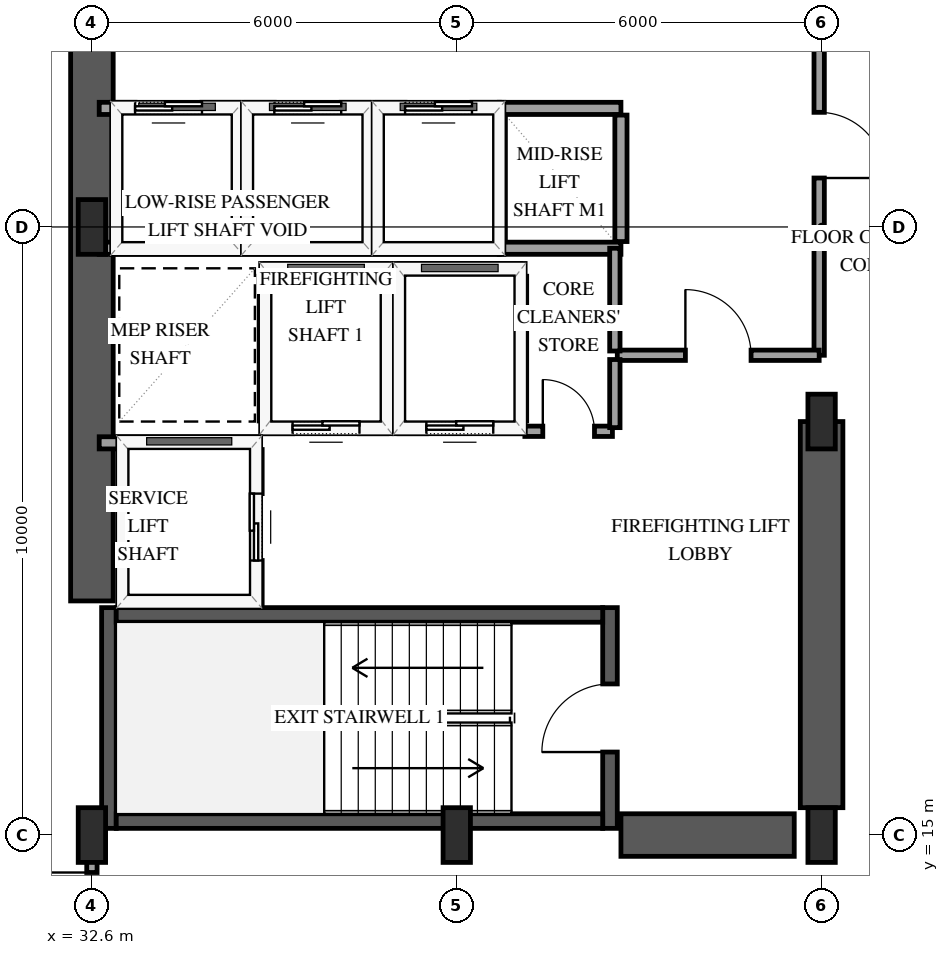
"""IFC4 building model, lengths in metres.
Left out: names, types, materials, properties, quantities, classifications, styles, units other than length and angle.
Written with IfcOpenShell. Run it as: python <this file> out.ifc"""

import sys

from ifc_helpers import new_model, si_unit, direction, frame, frame_2d, origin, origin_2d, place, context, subcontext, project, spatial, rectangle, extrude, element, fill, save


model = new_model("IFC4")
c1 = context("Model", 3, precision=1e-05, world=origin(), true_north=direction((0.0, 1.0)))
c2 = subcontext(c1, "Body", "Model", "MODEL_VIEW")
j1 = project(units=[si_unit("LENGTHUNIT", "METRE"), si_unit("PLANEANGLEUNIT", "RADIAN")], contexts=[c1])
p1 = place(None, origin())
s1 = spatial("IfcSite", under=j1, at=p1, CompositionType="ELEMENT")
p2 = place(p1, origin())
s2 = spatial("IfcBuilding", under=s1, at=p2, CompositionType="ELEMENT")
p3 = place(p2, frame((0.0, 0.0, 34.6)))
s3 = spatial("IfcBuildingStorey", under=s2, at=p3, CompositionType="ELEMENT", Elevation=34.6)
p4 = place(p3, frame((32.88, 15.11, 0.0), z_axis=(0.0, 0.0, 1.0), x_axis=(0.0, 1.0, 0.0)))
e1 = element("IfcWall", 1, at=p4, inside=s3, PredefinedType="SHEAR", context=c2, shape_type="SweptSolid", body=[
    extrude(rectangle(XDim=3.63, YDim=0.24, at=frame_2d((1.815, 0.0))), origin(), (0.0, 0.0, 1.0), 4.0),
])
p5 = place(p3, frame((41.12, 15.11, 0.0), z_axis=(0.0, 0.0, 1.0), x_axis=(0.0, 1.0, 0.0)))
e2 = element("IfcWall", 2, at=p5, inside=s3, PredefinedType="SHEAR", context=c2, shape_type="SweptSolid", body=[
    extrude(rectangle(XDim=3.63, YDim=0.24, at=frame_2d((1.815, 0.0))), origin(), (0.0, 0.0, 1.0), 4.0),
])
p6 = place(p5, frame((1.255, 0.0, 0.0)))
e3 = element("IfcOpeningElement", 3, at=p6, cuts=e2, PredefinedType="OPENING", context=c2, shape_type="SweptSolid", body=[
    extrude(rectangle(XDim=1.12, YDim=2.15, at=frame_2d((0.56, 1.075))), frame((0.0, 0.13, 0.0), z_axis=(0.0, -1.0, 0.0), x_axis=(1.0, 0.0, 0.0)), (0.0, 0.0, 1.0), 0.26),
])
for number, where, z_axis, x_axis in (
    (4, (33.0, 15.23, 0.0), (0.0, 0.0, 1.0), (1.0, 0.0, 0.0)),
    (5, (33.0, 18.62, 0.0), (0.0, 0.0, 1.0), (1.0, 0.0, 0.0)),
):
    element("IfcWall", number, at=place(p3, frame(where, z_axis=z_axis, x_axis=x_axis)), inside=s3, PredefinedType="SHEAR", context=c2, shape_type="SweptSolid", body=[
        extrude(rectangle(XDim=8.0, YDim=0.24, at=frame_2d((4.0, 0.0))), origin(), (0.0, 0.0, 1.0), 4.0),
    ])
p7 = place(p3, frame((32.6, 18.85, 0.0), z_axis=(0.0, 0.0, 1.0), x_axis=(0.0, 1.0, 0.0)))
e6 = element("IfcWall", 6, at=p7, inside=s3, PredefinedType="SHEAR", context=c2, shape_type="SweptSolid", body=[
    extrude(rectangle(XDim=12.3, YDim=0.7, at=frame_2d((6.15, 0.0))), origin(), (0.0, 0.0, 1.0), 4.0),
])
p8 = place(p3, frame((41.3, 15.0, 0.0), z_axis=(0.0, 0.0, 1.0), x_axis=(1.0, 0.0, 0.0)))
e7 = element("IfcWall", 7, at=p8, inside=s3, PredefinedType="SHEAR", context=c2, shape_type="SweptSolid", body=[
    extrude(rectangle(XDim=2.85, YDim=0.7, at=frame_2d((1.425, 0.0))), origin(), (0.0, 0.0, 1.0), 4.0),
])
p9 = place(p3, frame((44.6, 15.45, 0.0), z_axis=(0.0, 0.0, 1.0), x_axis=(0.0, 1.0, 0.0)))
e8 = element("IfcWall", 8, at=p9, inside=s3, PredefinedType="SHEAR", context=c2, shape_type="SweptSolid", body=[
    extrude(rectangle(XDim=6.35, YDim=0.7, at=frame_2d((3.175, 0.0))), origin(), (0.0, 0.0, 1.0), 4.0),
])
for number, where, z_axis, x_axis in (
    (9, (32.6, 15.0, 0.0), (0.0, 0.0, 1.0), (1.0, 0.0, 0.0)),
    (10, (32.6, 25.0, 0.0), (0.0, 0.0, 1.0), (1.0, 0.0, 0.0)),
    (11, (38.6, 15.0, 0.0), (0.0, 0.0, 1.0), (1.0, 0.0, 0.0)),
    (12, (44.6, 15.0, 0.0), (0.0, 0.0, 1.0), (1.0, 0.0, 0.0)),
    (13, (44.6, 21.8, 0.0), (0.0, 0.0, 1.0), (1.0, 0.0, 0.0)),
):
    element("IfcColumn", number, at=place(p3, frame(where, z_axis=z_axis, x_axis=x_axis)), inside=s3, PredefinedType="PILASTER", context=c2, shape_type="SweptSolid", body=[
        extrude(rectangle(XDim=0.45, YDim=0.9, at=origin_2d()), origin(), (0.0, 0.0, 1.0), 4.0),
    ])
p10 = place(p3, frame((35.45, 21.7, 0.0), z_axis=(0.0, 0.0, 1.0), x_axis=(1.0, 0.0, 0.0)))
e14 = element("IfcWall", 14, at=p10, inside=s3, PredefinedType="SOLIDWALL", context=c2, shape_type="SweptSolid", body=[
    extrude(rectangle(XDim=2.0, YDim=0.2, at=frame_2d((1.0, 0.0))), origin(), (0.0, 0.0, 1.0), 3.7),
])
p11 = place(p10, frame((0.45, 0.0, 0.0)))
e15 = element("IfcOpeningElement", 15, at=p11, cuts=e14, PredefinedType="OPENING", context=c2, shape_type="SweptSolid", body=[
    extrude(rectangle(XDim=1.1, YDim=2.15, at=frame_2d((0.55, 1.075))), frame((0.0, 0.11, 0.0), z_axis=(0.0, -1.0, 0.0), x_axis=(1.0, 0.0, 0.0)), (0.0, 0.0, 1.0), 0.22),
])
p12 = place(p3, frame((35.45, 24.3, 0.0), z_axis=(0.0, 0.0, 1.0), x_axis=(1.0, 0.0, 0.0)))
e16 = element("IfcWall", 16, at=p12, inside=s3, PredefinedType="SOLIDWALL", context=c2, shape_type="SweptSolid", body=[
    extrude(rectangle(XDim=2.0, YDim=0.2, at=frame_2d((1.0, 0.0))), origin(), (0.0, 0.0, 1.0), 3.7),
])
for number, where, z_axis, x_axis in (
    (17, (35.45, 21.81, 0.0), (0.0, 0.0, 1.0), (0.0, 1.0, 0.0)),
    (18, (37.45, 21.81, 0.0), (0.0, 0.0, 1.0), (0.0, 1.0, 0.0)),
):
    element("IfcWall", number, at=place(p3, frame(where, z_axis=z_axis, x_axis=x_axis)), inside=s3, PredefinedType="SOLIDWALL", context=c2, shape_type="SweptSolid", body=[
        extrude(rectangle(XDim=2.38, YDim=0.2, at=frame_2d((1.19, 0.0))), origin(), (0.0, 0.0, 1.0), 3.7),
    ])
p13 = place(p3, frame((37.65, 21.7, 0.0), z_axis=(0.0, 0.0, 1.0), x_axis=(1.0, 0.0, 0.0)))
e19 = element("IfcWall", 19, at=p13, inside=s3, PredefinedType="SOLIDWALL", context=c2, shape_type="SweptSolid", body=[
    extrude(rectangle(XDim=2.0, YDim=0.2, at=frame_2d((1.0, 0.0))), origin(), (0.0, 0.0, 1.0), 3.7),
])
p14 = place(p13, frame((0.45, 0.0, 0.0)))
e20 = element("IfcOpeningElement", 20, at=p14, cuts=e19, PredefinedType="OPENING", context=c2, shape_type="SweptSolid", body=[
    extrude(rectangle(XDim=1.1, YDim=2.15, at=frame_2d((0.55, 1.075))), frame((0.0, 0.11, 0.0), z_axis=(0.0, -1.0, 0.0), x_axis=(1.0, 0.0, 0.0)), (0.0, 0.0, 1.0), 0.22),
])
p15 = place(p3, frame((37.65, 24.3, 0.0), z_axis=(0.0, 0.0, 1.0), x_axis=(1.0, 0.0, 0.0)))
e21 = element("IfcWall", 21, at=p15, inside=s3, PredefinedType="SOLIDWALL", context=c2, shape_type="SweptSolid", body=[
    extrude(rectangle(XDim=2.0, YDim=0.2, at=frame_2d((1.0, 0.0))), origin(), (0.0, 0.0, 1.0), 3.7),
])
p16 = place(p3, frame((39.65, 21.81, 0.0), z_axis=(0.0, 0.0, 1.0), x_axis=(0.0, 1.0, 0.0)))
e22 = element("IfcWall", 22, at=p16, inside=s3, PredefinedType="SOLIDWALL", context=c2, shape_type="SweptSolid", body=[
    extrude(rectangle(XDim=2.38, YDim=0.2, at=frame_2d((1.19, 0.0))), origin(), (0.0, 0.0, 1.0), 3.7),
])
p17 = place(p3, frame((32.72, 21.45, 0.0), z_axis=(0.0, 0.0, 1.0), x_axis=(1.0, 0.0, 0.0)))
e23 = element("IfcWall", 23, at=p17, inside=s3, PredefinedType="SOLIDWALL", context=c2, shape_type="SweptSolid", body=[
    extrude(rectangle(XDim=2.58, YDim=0.2, at=frame_2d((1.29, 0.0))), origin(), (0.0, 0.0, 1.0), 3.7),
])
p18 = place(p3, frame((35.3, 18.79, 0.0), z_axis=(0.0, 0.0, 1.0), x_axis=(0.0, 1.0, 0.0)))
e24 = element("IfcWall", 24, at=p18, inside=s3, PredefinedType="SOLIDWALL", context=c2, shape_type="SweptSolid", body=[
    extrude(rectangle(XDim=2.55, YDim=0.2, at=frame_2d((1.275, 0.0))), origin(), (0.0, 0.0, 1.0), 3.7),
])
p19 = place(p18, frame((0.725, 0.0, 0.0)))
e25 = element("IfcOpeningElement", 25, at=p19, cuts=e24, PredefinedType="OPENING", context=c2, shape_type="SweptSolid", body=[
    extrude(rectangle(XDim=1.1, YDim=2.15, at=frame_2d((0.55, 1.075))), frame((0.0, 0.11, 0.0), z_axis=(0.0, -1.0, 0.0), x_axis=(1.0, 0.0, 0.0)), (0.0, 0.0, 1.0), 0.22),
])
p20 = place(p3, frame((32.72, 24.65, 0.0), z_axis=(0.0, 0.0, 1.0), x_axis=(1.0, 0.0, 0.0)))
e26 = element("IfcWall", 26, at=p20, inside=s3, PredefinedType="SOLIDWALL", context=c2, shape_type="SweptSolid", body=[
    extrude(rectangle(XDim=2.28, YDim=0.2, at=frame_2d((1.14, 0.0))), origin(), (0.0, 0.0, 1.0), 3.7),
])
p21 = place(p3, frame((32.72, 26.95, 0.0), z_axis=(0.0, 0.0, 1.0), x_axis=(1.0, 0.0, 0.0)))
e27 = element("IfcWall", 27, at=p21, inside=s3, PredefinedType="SOLIDWALL", context=c2, shape_type="SweptSolid", body=[
    extrude(rectangle(XDim=2.28, YDim=0.2, at=frame_2d((1.14, 0.0))), origin(), (0.0, 0.0, 1.0), 3.7),
])
p22 = place(p21, frame((0.59, 0.0, 0.0)))
e28 = element("IfcOpeningElement", 28, at=p22, cuts=e27, PredefinedType="OPENING", context=c2, shape_type="SweptSolid", body=[
    extrude(rectangle(XDim=1.1, YDim=2.15, at=frame_2d((0.55, 1.075))), frame((0.0, 0.11, 0.0), z_axis=(0.0, -1.0, 0.0), x_axis=(1.0, 0.0, 0.0)), (0.0, 0.0, 1.0), 0.22),
])
p23 = place(p3, frame((35.0, 24.76, 0.0), z_axis=(0.0, 0.0, 1.0), x_axis=(0.0, 1.0, 0.0)))
e29 = element("IfcWall", 29, at=p23, inside=s3, PredefinedType="SOLIDWALL", context=c2, shape_type="SweptSolid", body=[
    extrude(rectangle(XDim=2.08, YDim=0.2, at=frame_2d((1.04, 0.0))), origin(), (0.0, 0.0, 1.0), 3.7),
])
p24 = place(p3, frame((35.15, 24.65, 0.0), z_axis=(0.0, 0.0, 1.0), x_axis=(1.0, 0.0, 0.0)))
e30 = element("IfcWall", 30, at=p24, inside=s3, PredefinedType="SOLIDWALL", context=c2, shape_type="SweptSolid", body=[
    extrude(rectangle(XDim=2.0, YDim=0.2, at=frame_2d((1.0, 0.0))), origin(), (0.0, 0.0, 1.0), 3.7),
])
p25 = place(p3, frame((35.15, 26.95, 0.0), z_axis=(0.0, 0.0, 1.0), x_axis=(1.0, 0.0, 0.0)))
e31 = element("IfcWall", 31, at=p25, inside=s3, PredefinedType="SOLIDWALL", context=c2, shape_type="SweptSolid", body=[
    extrude(rectangle(XDim=2.0, YDim=0.2, at=frame_2d((1.0, 0.0))), origin(), (0.0, 0.0, 1.0), 3.7),
])
p26 = place(p25, frame((0.45, 0.0, 0.0)))
e32 = element("IfcOpeningElement", 32, at=p26, cuts=e31, PredefinedType="OPENING", context=c2, shape_type="SweptSolid", body=[
    extrude(rectangle(XDim=1.1, YDim=2.15, at=frame_2d((0.55, 1.075))), frame((0.0, 0.11, 0.0), z_axis=(0.0, -1.0, 0.0), x_axis=(1.0, 0.0, 0.0)), (0.0, 0.0, 1.0), 0.22),
])
p27 = place(p3, frame((37.15, 24.76, 0.0), z_axis=(0.0, 0.0, 1.0), x_axis=(0.0, 1.0, 0.0)))
e33 = element("IfcWall", 33, at=p27, inside=s3, PredefinedType="SOLIDWALL", context=c2, shape_type="SweptSolid", body=[
    extrude(rectangle(XDim=2.08, YDim=0.2, at=frame_2d((1.04, 0.0))), origin(), (0.0, 0.0, 1.0), 3.7),
])
p28 = place(p3, frame((37.3, 24.65, 0.0), z_axis=(0.0, 0.0, 1.0), x_axis=(1.0, 0.0, 0.0)))
e34 = element("IfcWall", 34, at=p28, inside=s3, PredefinedType="SOLIDWALL", context=c2, shape_type="SweptSolid", body=[
    extrude(rectangle(XDim=2.0, YDim=0.2, at=frame_2d((1.0, 0.0))), origin(), (0.0, 0.0, 1.0), 3.7),
])
p29 = place(p3, frame((37.3, 26.95, 0.0), z_axis=(0.0, 0.0, 1.0), x_axis=(1.0, 0.0, 0.0)))
e35 = element("IfcWall", 35, at=p29, inside=s3, PredefinedType="SOLIDWALL", context=c2, shape_type="SweptSolid", body=[
    extrude(rectangle(XDim=2.0, YDim=0.2, at=frame_2d((1.0, 0.0))), origin(), (0.0, 0.0, 1.0), 3.7),
])
p30 = place(p29, frame((0.45, 0.0, 0.0)))
e36 = element("IfcOpeningElement", 36, at=p30, cuts=e35, PredefinedType="OPENING", context=c2, shape_type="SweptSolid", body=[
    extrude(rectangle(XDim=1.1, YDim=2.15, at=frame_2d((0.55, 1.075))), frame((0.0, 0.11, 0.0), z_axis=(0.0, -1.0, 0.0), x_axis=(1.0, 0.0, 0.0)), (0.0, 0.0, 1.0), 0.22),
])
p31 = place(p3, frame((39.3, 24.76, 0.0), z_axis=(0.0, 0.0, 1.0), x_axis=(0.0, 1.0, 0.0)))
e37 = element("IfcWall", 37, at=p31, inside=s3, PredefinedType="SOLIDWALL", context=c2, shape_type="SweptSolid", body=[
    extrude(rectangle(XDim=2.08, YDim=0.2, at=frame_2d((1.04, 0.0))), origin(), (0.0, 0.0, 1.0), 3.7),
])
for number, where, z_axis, x_axis in (
    (38, (39.3, 24.65, 0.0), (0.0, 0.0, 1.0), (1.0, 0.0, 0.0)),
    (39, (39.3, 26.95, 0.0), (0.0, 0.0, 1.0), (1.0, 0.0, 0.0)),
):
    element("IfcWall", number, at=place(p3, frame(where, z_axis=z_axis, x_axis=x_axis)), inside=s3, PredefinedType="SOLIDWALL", context=c2, shape_type="SweptSolid", body=[
        extrude(rectangle(XDim=2.0, YDim=0.2, at=frame_2d((1.0, 0.0))), origin(), (0.0, 0.0, 1.0), 3.7),
    ])
p32 = place(p3, frame((41.3, 24.76, 0.0), z_axis=(0.0, 0.0, 1.0), x_axis=(0.0, 1.0, 0.0)))
e40 = element("IfcWall", 40, at=p32, inside=s3, PredefinedType="SOLIDWALL", context=c2, shape_type="SweptSolid", body=[
    extrude(rectangle(XDim=2.08, YDim=0.2, at=frame_2d((1.04, 0.0))), origin(), (0.0, 0.0, 1.0), 3.7),
])
p33 = place(p3, frame((44.56, 29.8, 0.0), z_axis=(0.0, 0.0, 1.0), x_axis=(0.0, -1.0, 0.0)))
e41 = element("IfcWall", 41, at=p33, inside=s3, PredefinedType="PARTITIONING", context=c2, shape_type="SweptSolid", body=[
    extrude(rectangle(XDim=6.91, YDim=0.17, at=frame_2d((3.455, 0.0))), origin(), (0.0, 0.0, 1.0), 2.74),
])
p34 = place(p33, frame((2.915, 0.0, 0.0)))
e42 = element("IfcOpeningElement", 42, at=p34, cuts=e41, PredefinedType="OPENING", context=c2, shape_type="SweptSolid", body=[
    extrude(rectangle(XDim=1.08, YDim=2.15, at=frame_2d((0.54, 1.075))), frame((0.0, 0.095, 0.0), z_axis=(0.0, -1.0, 0.0), x_axis=(1.0, 0.0, 0.0)), (0.0, 0.0, 1.0), 0.19),
])
p35 = place(p3, frame((41.24, 22.89, 0.0), z_axis=(0.0, 0.0, 1.0), x_axis=(1.0, 0.0, 0.0)))
e43 = element("IfcWall", 43, at=p35, inside=s3, PredefinedType="PARTITIONING", context=c2, shape_type="SweptSolid", body=[
    extrude(rectangle(XDim=3.32, YDim=0.17, at=frame_2d((1.66, 0.0))), origin(), (0.0, 0.0, 1.0), 3.7),
])
p36 = place(p35, frame((1.12, 0.0, 0.0)))
e44 = element("IfcOpeningElement", 44, at=p36, cuts=e43, PredefinedType="OPENING", context=c2, shape_type="SweptSolid", body=[
    extrude(rectangle(XDim=1.08, YDim=2.15, at=frame_2d((0.54, 1.075))), frame((0.0, 0.095, 0.0), z_axis=(0.0, -1.0, 0.0), x_axis=(1.0, 0.0, 0.0)), (0.0, 0.0, 1.0), 0.19),
])
p37 = place(p3, frame((32.6, 13.02, 0.0), z_axis=(0.0, 0.0, 1.0), x_axis=(0.0, 1.0, 0.0)))
e45 = element("IfcWall", 45, at=p37, inside=s3, PredefinedType="PARTITIONING", context=c2, shape_type="SweptSolid", body=[
    extrude(rectangle(XDim=1.91, YDim=0.17, at=frame_2d((0.955, 0.0))), origin(), (0.0, 0.0, 1.0), 3.7),
])
p38 = place(p37, frame((0.384, 0.0, 0.0)))
e46 = element("IfcOpeningElement", 46, at=p38, cuts=e45, PredefinedType="OPENING", context=c2, shape_type="SweptSolid", body=[
    extrude(rectangle(XDim=0.98, YDim=2.15, at=frame_2d((0.49, 1.075))), frame((0.0, 0.095, 0.0), z_axis=(0.0, -1.0, 0.0), x_axis=(1.0, 0.0, 0.0)), (0.0, 0.0, 1.0), 0.19),
])
p39 = place(p3, frame((41.2, 22.96, 0.0), z_axis=(0.0, 0.0, 1.0), x_axis=(0.0, 1.0, 0.0)))
e47 = element("IfcWall", 47, at=p39, inside=s3, PredefinedType="PARTITIONING", context=c2, shape_type="SweptSolid", body=[
    extrude(rectangle(XDim=1.69, YDim=0.17, at=frame_2d((0.845, 0.0))), origin(), (0.0, 0.0, 1.0), 3.7),
])
p40 = place(p3, frame((39.72, 21.64, 0.0), z_axis=(0.0, 0.0, 1.0), x_axis=(1.0, 0.0, 0.0)))
e48 = element("IfcWall", 48, at=p40, inside=s3, PredefinedType="PARTITIONING", context=c2, shape_type="SweptSolid", body=[
    extrude(rectangle(XDim=1.44, YDim=0.17, at=frame_2d((0.72, 0.0))), origin(), (0.0, 0.0, 1.0), 3.7),
])
p41 = place(p40, frame((0.295, 0.0, 0.0)))
e49 = element("IfcOpeningElement", 49, at=p41, cuts=e48, PredefinedType="OPENING", context=c2, shape_type="SweptSolid", body=[
    extrude(rectangle(XDim=0.85, YDim=2.1, at=frame_2d((0.425, 1.05))), frame((0.0, 0.095, 0.0), z_axis=(0.0, -1.0, 0.0), x_axis=(1.0, 0.0, 0.0)), (0.0, 0.0, 1.0), 0.19),
])
p42 = place(p3, frame((41.2, 21.7, 0.0), z_axis=(0.0, 0.0, 1.0), x_axis=(0.0, 1.0, 0.0)))
e50 = element("IfcWall", 50, at=p42, inside=s3, PredefinedType="PARTITIONING", context=c2, shape_type="SweptSolid", body=[
    extrude(rectangle(XDim=1.12, YDim=0.17, at=frame_2d((0.56, 0.0))), origin(), (0.0, 0.0, 1.0), 3.7),
])
p43 = place(p11, origin())
e51 = element("IfcDoor", 51, at=p43, inside=s3, OperationType="SLIDING_TO_LEFT", PredefinedType="DOOR", context=c2, shape_type="SweptSolid", body=[
    extrude(rectangle(XDim=1.1, YDim=2.15, at=frame_2d((0.55, 1.075))), frame((0.0, 0.025, 0.0), z_axis=(0.0, -1.0, 0.0), x_axis=(1.0, 0.0, 0.0)), (0.0, 0.0, 1.0), 0.05),
])
fill(e15, e51)
p44 = place(p14, origin())
e52 = element("IfcDoor", 52, at=p44, inside=s3, OperationType="SLIDING_TO_LEFT", PredefinedType="DOOR", context=c2, shape_type="SweptSolid", body=[
    extrude(rectangle(XDim=1.1, YDim=2.15, at=frame_2d((0.55, 1.075))), frame((0.0, 0.025, 0.0), z_axis=(0.0, -1.0, 0.0), x_axis=(1.0, 0.0, 0.0)), (0.0, 0.0, 1.0), 0.05),
])
fill(e20, e52)
p45 = place(p19, origin())
e53 = element("IfcDoor", 53, at=p45, inside=s3, OperationType="SLIDING_TO_LEFT", PredefinedType="DOOR", context=c2, shape_type="SweptSolid", body=[
    extrude(rectangle(XDim=1.1, YDim=2.15, at=frame_2d((0.55, 1.075))), frame((0.0, 0.025, 0.0), z_axis=(0.0, -1.0, 0.0), x_axis=(1.0, 0.0, 0.0)), (0.0, 0.0, 1.0), 0.05),
])
fill(e25, e53)
p46 = place(p22, origin())
e54 = element("IfcDoor", 54, at=p46, inside=s3, OperationType="SLIDING_TO_LEFT", PredefinedType="DOOR", context=c2, shape_type="SweptSolid", body=[
    extrude(rectangle(XDim=1.1, YDim=2.15, at=frame_2d((0.55, 1.075))), frame((0.0, 0.025, 0.0), z_axis=(0.0, -1.0, 0.0), x_axis=(1.0, 0.0, 0.0)), (0.0, 0.0, 1.0), 0.05),
])
fill(e28, e54)
p47 = place(p26, origin())
e55 = element("IfcDoor", 55, at=p47, inside=s3, OperationType="SLIDING_TO_LEFT", PredefinedType="DOOR", context=c2, shape_type="SweptSolid", body=[
    extrude(rectangle(XDim=1.1, YDim=2.15, at=frame_2d((0.55, 1.075))), frame((0.0, 0.025, 0.0), z_axis=(0.0, -1.0, 0.0), x_axis=(1.0, 0.0, 0.0)), (0.0, 0.0, 1.0), 0.05),
])
fill(e32, e55)
p48 = place(p30, origin())
e56 = element("IfcDoor", 56, at=p48, inside=s3, OperationType="SLIDING_TO_LEFT", PredefinedType="DOOR", context=c2, shape_type="SweptSolid", body=[
    extrude(rectangle(XDim=1.1, YDim=2.15, at=frame_2d((0.55, 1.075))), frame((0.0, 0.025, 0.0), z_axis=(0.0, -1.0, 0.0), x_axis=(1.0, 0.0, 0.0)), (0.0, 0.0, 1.0), 0.05),
])
fill(e36, e56)
p49 = place(p6, origin())
e57 = element("IfcDoor", 57, at=p49, inside=s3, OperationType="SINGLE_SWING_LEFT", PredefinedType="DOOR", context=c2, shape_type="SweptSolid", body=[
    extrude(rectangle(XDim=1.12, YDim=2.15, at=frame_2d((0.56, 1.075))), frame((0.0, 0.025, 0.0), z_axis=(0.0, -1.0, 0.0), x_axis=(1.0, 0.0, 0.0)), (0.0, 0.0, 1.0), 0.05),
])
fill(e3, e57)
p50 = place(p34, origin())
e58 = element("IfcDoor", 58, at=p50, inside=s3, OperationType="SINGLE_SWING_RIGHT", PredefinedType="DOOR", context=c2, shape_type="SweptSolid", body=[
    extrude(rectangle(XDim=1.08, YDim=2.15, at=frame_2d((0.54, 1.075))), frame((0.0, 0.025, 0.0), z_axis=(0.0, -1.0, 0.0), x_axis=(1.0, 0.0, 0.0)), (0.0, 0.0, 1.0), 0.05),
])
fill(e42, e58)
p51 = place(p36, origin())
e59 = element("IfcDoor", 59, at=p51, inside=s3, OperationType="SINGLE_SWING_LEFT", PredefinedType="DOOR", context=c2, shape_type="SweptSolid", body=[
    extrude(rectangle(XDim=1.08, YDim=2.15, at=frame_2d((0.54, 1.075))), frame((0.0, 0.025, 0.0), z_axis=(0.0, -1.0, 0.0), x_axis=(1.0, 0.0, 0.0)), (0.0, 0.0, 1.0), 0.05),
])
fill(e44, e59)
p52 = place(p38, origin())
e60 = element("IfcDoor", 60, at=p52, inside=s3, OperationType="SINGLE_SWING_RIGHT", PredefinedType="DOOR", context=c2, shape_type="SweptSolid", body=[
    extrude(rectangle(XDim=0.98, YDim=2.15, at=frame_2d((0.49, 1.075))), frame((0.0, 0.025, 0.0), z_axis=(0.0, -1.0, 0.0), x_axis=(1.0, 0.0, 0.0)), (0.0, 0.0, 1.0), 0.05),
])
fill(e46, e60)
p53 = place(p41, origin())
e61 = element("IfcDoor", 61, at=p53, inside=s3, OperationType="SINGLE_SWING_LEFT", PredefinedType="DOOR", context=c2, shape_type="SweptSolid", body=[
    extrude(rectangle(XDim=0.85, YDim=2.1, at=frame_2d((0.425, 1.05))), frame((0.0, 0.025, 0.0), z_axis=(0.0, -1.0, 0.0), x_axis=(1.0, 0.0, 0.0)), (0.0, 0.0, 1.0), 0.05),
])
fill(e49, e61)
save(model, sys.argv[1])
